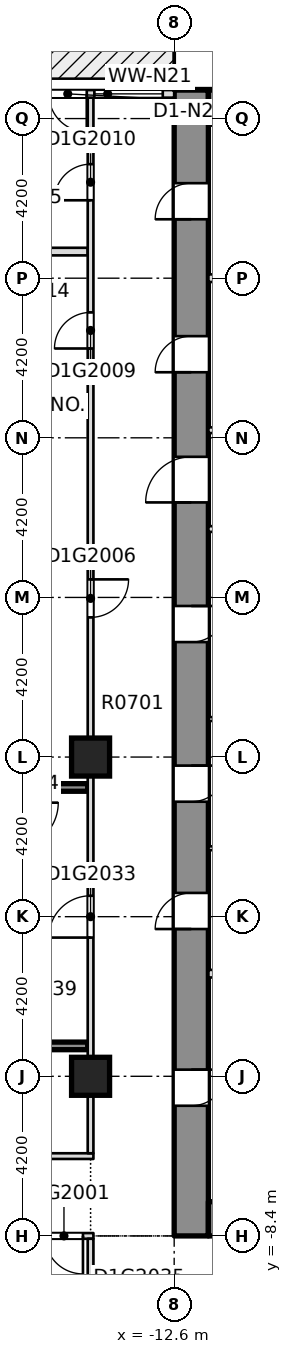
"""IFC4 building model, lengths in metres.
Left out: names, types, materials, properties, quantities, classifications, styles, units other than length and angle.
Written with IfcOpenShell. Run it as: python <this file> out.ifc"""

import sys

from ifc_helpers import new_model, si_unit, direction, frame, frame_2d, origin, origin_2d, place, context, subcontext, project, spatial, rectangle, extrude, element, fill, save


model = new_model("IFC4")
c1 = context("Model", 3, precision=1e-05, world=origin(), true_north=direction((0.0, 1.0)))
c2 = subcontext(c1, "Body", "Model", "MODEL_VIEW")
j1 = project(units=[si_unit("LENGTHUNIT", "METRE"), si_unit("PLANEANGLEUNIT", "RADIAN")], contexts=[c1])
p1 = place(None, origin())
s1 = spatial("IfcSite", under=j1, at=p1, CompositionType="ELEMENT")
p2 = place(p1, origin())
s2 = spatial("IfcBuilding", under=s1, at=p2, CompositionType="ELEMENT")
p3 = place(p2, frame((0.0, 0.0, 37.95)))
s3 = spatial("IfcBuildingStorey", under=s2, at=p3, CompositionType="ELEMENT", Elevation=37.95)
p4 = place(p3, frame((-12.15, -8.4, -0.32), z_axis=(0.0, 0.0, 1.0), x_axis=(0.0, 1.0, 0.0)))
e1 = element("IfcWall", 1, at=p4, inside=s3, PredefinedType="SHEAR", context=c2, shape_type="SweptSolid", body=[
    extrude(rectangle(XDim=30.15, YDim=0.9, at=frame_2d((15.075, 0.0))), origin(), (0.0, 0.0, 1.0), 3.45),
])
p5 = place(p4, frame((3.425, 0.0, 0.32)))
e2 = element("IfcOpeningElement", 2, at=p5, cuts=e1, PredefinedType="OPENING", context=c2, shape_type="SweptSolid", body=[
    extrude(rectangle(XDim=0.95, YDim=2.1, at=frame_2d((0.475, 1.05))), frame((0.0, 0.46, 0.0), z_axis=(0.0, -1.0, 0.0), x_axis=(1.0, 0.0, 0.0)), (0.0, 0.0, 1.0), 0.92),
])
p6 = place(p4, frame((8.075, 0.0, 0.32)))
e3 = element("IfcOpeningElement", 3, at=p6, cuts=e1, PredefinedType="OPENING", context=c2, shape_type="SweptSolid", body=[
    extrude(rectangle(XDim=0.95, YDim=2.1, at=frame_2d((0.475, 1.05))), frame((0.0, 0.46, 0.0), z_axis=(0.0, -1.0, 0.0), x_axis=(1.0, 0.0, 0.0)), (0.0, 0.0, 1.0), 0.92),
])
p7 = place(p4, frame((11.425, 0.0, 0.32)))
e4 = element("IfcOpeningElement", 4, at=p7, cuts=e1, PredefinedType="OPENING", context=c2, shape_type="SweptSolid", body=[
    extrude(rectangle(XDim=0.95, YDim=2.1, at=frame_2d((0.475, 1.05))), frame((0.0, 0.46, 0.0), z_axis=(0.0, -1.0, 0.0), x_axis=(1.0, 0.0, 0.0)), (0.0, 0.0, 1.0), 0.92),
])
p8 = place(p4, frame((15.625, 0.0, 0.32)))
e5 = element("IfcOpeningElement", 5, at=p8, cuts=e1, PredefinedType="OPENING", context=c2, shape_type="SweptSolid", body=[
    extrude(rectangle(XDim=0.95, YDim=2.1, at=frame_2d((0.475, 1.05))), frame((0.0, 0.46, 0.0), z_axis=(0.0, -1.0, 0.0), x_axis=(1.0, 0.0, 0.0)), (0.0, 0.0, 1.0), 0.92),
])
p9 = place(p4, frame((22.725, 0.0, 0.32)))
e6 = element("IfcOpeningElement", 6, at=p9, cuts=e1, PredefinedType="OPENING", context=c2, shape_type="SweptSolid", body=[
    extrude(rectangle(XDim=0.95, YDim=2.1, at=frame_2d((0.475, 1.05))), frame((0.0, 0.46, 0.0), z_axis=(0.0, -1.0, 0.0), x_axis=(1.0, 0.0, 0.0)), (0.0, 0.0, 1.0), 0.92),
])
p10 = place(p4, frame((26.75, 0.0, 0.32)))
e7 = element("IfcOpeningElement", 7, at=p10, cuts=e1, PredefinedType="OPENING", context=c2, shape_type="SweptSolid", body=[
    extrude(rectangle(XDim=0.95, YDim=2.1, at=frame_2d((0.475, 1.05))), frame((0.0, 0.46, 0.0), z_axis=(0.0, -1.0, 0.0), x_axis=(1.0, 0.0, 0.0)), (0.0, 0.0, 1.0), 0.92),
])
p11 = place(p4, frame((19.3, 0.0, 0.32)))
e8 = element("IfcOpeningElement", 8, at=p11, cuts=e1, PredefinedType="OPENING", context=c2, shape_type="SweptSolid", body=[
    extrude(rectangle(XDim=1.2, YDim=2.1, at=frame_2d((0.6, 1.05))), frame((0.0, 0.46, 0.0), z_axis=(0.0, -1.0, 0.0), x_axis=(1.0, 0.0, 0.0)), (0.0, 0.0, 1.0), 0.92),
])
p12 = place(p3, frame((-11.7, -7.95, -0.32), z_axis=(0.0, 0.0, 1.0), x_axis=(1.0, 0.0, 0.0)))
e9 = element("IfcWall", 9, at=p12, inside=s3, PredefinedType="SHEAR", context=c2, shape_type="SweptSolid", body=[
    extrude(rectangle(XDim=23.4, YDim=0.9, at=frame_2d((11.7, 0.0))), origin(), (0.0, 0.0, 1.0), 3.45),
])
p13 = place(p12, frame((6.95, 0.0, 0.32)))
e10 = element("IfcOpeningElement", 10, at=p13, cuts=e9, PredefinedType="OPENING", context=c2, shape_type="SweptSolid", body=[
    extrude(rectangle(XDim=1.8, YDim=2.1, at=frame_2d((0.9, 1.05))), frame((0.0, 0.46, 0.0), z_axis=(0.0, -1.0, 0.0), x_axis=(1.0, 0.0, 0.0)), (0.0, 0.0, 1.0), 0.92),
])
p14 = place(p12, frame((14.65, 0.0, 0.32)))
e11 = element("IfcOpeningElement", 11, at=p14, cuts=e9, PredefinedType="OPENING", context=c2, shape_type="SweptSolid", body=[
    extrude(rectangle(XDim=1.8, YDim=2.1, at=frame_2d((0.9, 1.05))), frame((0.0, 0.46, 0.0), z_axis=(0.0, -1.0, 0.0), x_axis=(1.0, 0.0, 0.0)), (0.0, 0.0, 1.0), 0.92),
])
p15 = place(p3, frame((-11.7, 21.3, -0.32), z_axis=(0.0, 0.0, 1.0), x_axis=(1.0, 0.0, 0.0)))
e12 = element("IfcWall", 12, at=p15, inside=s3, PredefinedType="SOLIDWALL", context=c2, shape_type="SweptSolid", body=[
    extrude(rectangle(XDim=23.4, YDim=0.9, at=frame_2d((11.7, 0.0))), origin(), (0.0, 0.0, 1.0), 3.45),
])
for number, where, z_axis, x_axis in (
    (13, (-14.8, -4.2, -0.32), (0.0, 0.0, 1.0), (1.0, 0.0, 0.0)),
    (14, (-14.8, 4.2, -0.32), (0.0, 0.0, 1.0), (1.0, 0.0, 0.0)),
):
    element("IfcColumn", number, at=place(p3, frame(where, z_axis=z_axis, x_axis=x_axis)), inside=s3, PredefinedType="COLUMN", context=c2, shape_type="SweptSolid", body=[
        extrude(rectangle(XDim=1.0, YDim=1.0, at=origin_2d()), origin(), (0.0, 0.0, 1.0), 3.45),
    ])
p16 = place(p3, frame((-25.75, -8.4, 0.0), z_axis=(0.0, 0.0, 1.0), x_axis=(1.0, 0.0, 0.0)))
e15 = element("IfcWall", 15, at=p16, inside=s3, PredefinedType="PARTITIONING", context=c2, shape_type="SweptSolid", body=[
    extrude(rectangle(XDim=11.025, YDim=0.15, at=frame_2d((5.512, 0.0))), origin(), (0.0, 0.0, 1.0), 3.13),
])
p17 = place(p16, frame((9.75, 0.0, 0.0)))
e16 = element("IfcOpeningElement", 16, at=p17, cuts=e15, PredefinedType="OPENING", context=c2, shape_type="SweptSolid", body=[
    extrude(rectangle(XDim=1.0, YDim=2.1, at=frame_2d((0.5, 1.05))), frame((0.0, 0.085, 0.0), z_axis=(0.0, -1.0, 0.0), x_axis=(1.0, 0.0, 0.0)), (0.0, 0.0, 1.0), 0.17),
])
p18 = place(p3, frame((-25.75, -6.3, 0.0), z_axis=(0.0, 0.0, 1.0), x_axis=(1.0, 0.0, 0.0)))
e17 = element("IfcWall", 17, at=p18, inside=s3, PredefinedType="PARTITIONING", context=c2, shape_type="SweptSolid", body=[
    extrude(rectangle(XDim=11.025, YDim=0.15, at=frame_2d((5.512, 0.0))), origin(), (0.0, 0.0, 1.0), 3.13),
])
p19 = place(p18, frame((4.875, 0.0, 0.0)))
e18 = element("IfcOpeningElement", 18, at=p19, cuts=e17, PredefinedType="OPENING", context=c2, shape_type="SweptSolid", body=[
    extrude(rectangle(XDim=1.0, YDim=2.1, at=frame_2d((0.5, 1.05))), frame((0.0, 0.085, 0.0), z_axis=(0.0, -1.0, 0.0), x_axis=(1.0, 0.0, 0.0)), (0.0, 0.0, 1.0), 0.17),
])
p20 = place(p3, frame((-23.0, -3.4, 0.0), z_axis=(0.0, 0.0, 1.0), x_axis=(1.0, 0.0, 0.0)))
e19 = element("IfcWall", 19, at=p20, inside=s3, PredefinedType="SOLIDWALL", context=c2, shape_type="SweptSolid", body=[
    extrude(rectangle(XDim=8.125, YDim=0.2, at=frame_2d((4.062, 0.0))), origin(), (0.0, 0.0, 1.0), 3.13),
])
p21 = place(p3, frame((-20.45, 3.4, 0.0), z_axis=(0.0, 0.0, 1.0), x_axis=(1.0, 0.0, 0.0)))
e20 = element("IfcWall", 20, at=p21, inside=s3, PredefinedType="SOLIDWALL", context=c2, shape_type="SweptSolid", body=[
    extrude(rectangle(XDim=5.575, YDim=0.2, at=frame_2d((2.788, 0.0))), origin(), (0.0, 0.0, 1.0), 3.13),
])
for number, where, z_axis, x_axis in (
    (21, (-17.35, 13.35, 0.0), (0.0, 0.0, 1.0), (1.0, 0.0, 0.0)),
    (22, (-17.35, 17.5, 0.0), (0.0, 0.0, 1.0), (1.0, 0.0, 0.0)),
):
    element("IfcWall", number, at=place(p3, frame(where, z_axis=z_axis, x_axis=x_axis)), inside=s3, PredefinedType="PARTITIONING", context=c2, shape_type="SweptSolid", body=[
        extrude(rectangle(XDim=2.475, YDim=0.2, at=frame_2d((1.238, 0.0))), origin(), (0.0, 0.0, 1.0), 3.13),
    ])
p22 = place(p3, frame((-14.8, -10.525, 0.0), z_axis=(0.0, 0.0, 1.0), x_axis=(0.0, 1.0, 0.0)))
e23 = element("IfcWall", 23, at=p22, inside=s3, PredefinedType="PARTITIONING", context=c2, shape_type="SweptSolid", body=[
    extrude(rectangle(XDim=2.05, YDim=0.15, at=frame_2d((1.025, 0.0))), origin(), (0.0, 0.0, 1.0), 3.13),
])
p23 = place(p3, frame((-14.8, -6.225, 0.0), z_axis=(0.0, 0.0, 1.0), x_axis=(0.0, 1.0, 0.0)))
e24 = element("IfcWall", 24, at=p23, inside=s3, PredefinedType="PARTITIONING", context=c2, shape_type="SweptSolid", body=[
    extrude(rectangle(XDim=27.775, YDim=0.15, at=frame_2d((13.888, 0.0))), origin(), (0.0, 0.0, 1.0), 3.13),
])
p24 = place(p23, frame((14.1, 0.0, 0.0)))
e25 = element("IfcOpeningElement", 25, at=p24, cuts=e24, PredefinedType="OPENING", context=c2, shape_type="SweptSolid", body=[
    extrude(rectangle(XDim=1.0, YDim=2.1, at=frame_2d((0.5, 1.05))), frame((0.0, 0.085, 0.0), z_axis=(0.0, -1.0, 0.0), x_axis=(1.0, 0.0, 0.0)), (0.0, 0.0, 1.0), 0.17),
])
p25 = place(p23, frame((21.175, 0.0, 0.0)))
e26 = element("IfcOpeningElement", 26, at=p25, cuts=e24, PredefinedType="OPENING", context=c2, shape_type="SweptSolid", body=[
    extrude(rectangle(XDim=0.95, YDim=2.1, at=frame_2d((0.475, 1.05))), frame((0.0, 0.085, 0.0), z_axis=(0.0, -1.0, 0.0), x_axis=(1.0, 0.0, 0.0)), (0.0, 0.0, 1.0), 0.17),
])
p26 = place(p23, frame((25.075, 0.0, 0.0)))
e27 = element("IfcOpeningElement", 27, at=p26, cuts=e24, PredefinedType="OPENING", context=c2, shape_type="SweptSolid", body=[
    extrude(rectangle(XDim=0.95, YDim=2.1, at=frame_2d((0.475, 1.05))), frame((0.0, 0.085, 0.0), z_axis=(0.0, -1.0, 0.0), x_axis=(1.0, 0.0, 0.0)), (0.0, 0.0, 1.0), 0.17),
])
p27 = place(p23, frame((5.675, 0.0, 0.0)))
e28 = element("IfcOpeningElement", 28, at=p27, cuts=e24, PredefinedType="OPENING", context=c2, shape_type="SweptSolid", body=[
    extrude(rectangle(XDim=1.1, YDim=2.1, at=frame_2d((0.55, 1.05))), frame((0.0, 0.085, 0.0), z_axis=(0.0, -1.0, 0.0), x_axis=(1.0, 0.0, 0.0)), (0.0, 0.0, 1.0), 0.17),
])
p28 = place(p3, frame((-12.6, 21.65, 0.0), z_axis=(0.0, 0.0, 1.0), x_axis=(-1.0, 0.0, 0.0)))
e29 = element("IfcWall", 29, at=p28, inside=s3, PredefinedType="STANDARD", context=c2, shape_type="SweptSolid", body=[
    extrude(rectangle(XDim=3.5, YDim=0.2, at=frame_2d((1.75, 0.0))), origin(), (0.0, 0.0, 1.0), 3.13),
])
p29 = place(p28, frame((0.3, 0.0, 0.2)))
e30 = element("IfcOpeningElement", 30, at=p29, cuts=e29, PredefinedType="OPENING", context=c2, shape_type="SweptSolid", body=[
    extrude(rectangle(XDim=1.8, YDim=2.65, at=frame_2d((0.9, 1.325))), frame((0.0, 0.11, 0.0), z_axis=(0.0, -1.0, 0.0), x_axis=(1.0, 0.0, 0.0)), (0.0, 0.0, 1.0), 0.22),
])
p30 = place(p28, frame((2.3, 0.0, 0.0)))
e31 = element("IfcOpeningElement", 31, at=p30, cuts=e29, PredefinedType="OPENING", context=c2, shape_type="SweptSolid", body=[
    extrude(rectangle(XDim=1.0, YDim=2.4, at=frame_2d((0.5, 1.2))), frame((0.0, 0.11, 0.0), z_axis=(0.0, -1.0, 0.0), x_axis=(1.0, 0.0, 0.0)), (0.0, 0.0, 1.0), 0.22),
])
p31 = place(p3, frame((-11.699, -1.5, 0.0), z_axis=(0.0, 0.0, 1.0), x_axis=(1.0, 0.0, 0.0)))
e32 = element("IfcWall", 32, at=p31, inside=s3, PredefinedType="PARTITIONING", context=c2, shape_type="SweptSolid", body=[
    extrude(rectangle(XDim=2.848, YDim=0.2, at=frame_2d((1.424, 0.0))), origin(), (0.0, 0.0, 1.0), 3.13),
])
for number, where, z_axis, x_axis in (
    (33, (-11.699, 1.8, 0.0), (0.0, 0.0, 1.0), (1.0, 0.0, 0.0)),
    (34, (-11.699, 5.2, 0.0), (0.0, 0.0, 1.0), (1.0, 0.0, 0.0)),
):
    element("IfcWall", number, at=place(p3, frame(where, z_axis=z_axis, x_axis=x_axis)), inside=s3, PredefinedType="PARTITIONING", context=c2, shape_type="SweptSolid", body=[
        extrude(rectangle(XDim=2.848, YDim=0.1, at=frame_2d((1.424, 0.0))), origin(), (0.0, 0.0, 1.0), 3.13),
    ])
for number, where, z_axis, x_axis in (
    (35, (-11.699, 10.2, 0.0), (0.0, 0.0, 1.0), (1.0, 0.0, 0.0)),
    (36, (-11.699, 12.8, 0.0), (0.0, 0.0, 1.0), (1.0, 0.0, 0.0)),
):
    element("IfcWall", number, at=place(p3, frame(where, z_axis=z_axis, x_axis=x_axis)), inside=s3, PredefinedType="PARTITIONING", context=c2, shape_type="SweptSolid", body=[
        extrude(rectangle(XDim=2.848, YDim=0.15, at=frame_2d((1.424, 0.0))), origin(), (0.0, 0.0, 1.0), 3.13),
    ])
p32 = place(p3, frame((-11.699, 16.8, 0.0), z_axis=(0.0, 0.0, 1.0), x_axis=(1.0, 0.0, 0.0)))
e37 = element("IfcWall", 37, at=p32, inside=s3, PredefinedType="PARTITIONING", context=c2, shape_type="SweptSolid", body=[
    extrude(rectangle(XDim=2.848, YDim=0.2, at=frame_2d((1.424, 0.0))), origin(), (0.0, 0.0, 1.0), 3.13),
])
p33 = place(p17, origin())
e38 = element("IfcDoor", 38, at=p33, inside=s3, OperationType="SINGLE_SWING_RIGHT", PredefinedType="DOOR", context=c2, shape_type="SweptSolid", body=[
    extrude(rectangle(XDim=1.0, YDim=2.1, at=frame_2d((0.5, 1.05))), frame((0.0, 0.025, 0.0), z_axis=(0.0, -1.0, 0.0), x_axis=(1.0, 0.0, 0.0)), (0.0, 0.0, 1.0), 0.05),
])
fill(e16, e38)
p34 = place(p24, origin())
e39 = element("IfcDoor", 39, at=p34, inside=s3, OperationType="SINGLE_SWING_LEFT", PredefinedType="DOOR", context=c2, shape_type="SweptSolid", body=[
    extrude(rectangle(XDim=1.0, YDim=2.1, at=frame_2d((0.5, 1.05))), frame((0.0, 0.025, 0.0), z_axis=(0.0, -1.0, 0.0), x_axis=(1.0, 0.0, 0.0)), (0.0, 0.0, 1.0), 0.05),
])
fill(e25, e39)
p35 = place(p25, origin())
e40 = element("IfcDoor", 40, at=p35, inside=s3, OperationType="SINGLE_SWING_RIGHT", PredefinedType="DOOR", context=c2, shape_type="SweptSolid", body=[
    extrude(rectangle(XDim=0.95, YDim=2.1, at=frame_2d((0.475, 1.05))), frame((0.0, 0.025, 0.0), z_axis=(0.0, -1.0, 0.0), x_axis=(1.0, 0.0, 0.0)), (0.0, 0.0, 1.0), 0.05),
])
fill(e26, e40)
p36 = place(p26, origin())
e41 = element("IfcDoor", 41, at=p36, inside=s3, OperationType="SINGLE_SWING_LEFT", PredefinedType="DOOR", context=c2, shape_type="SweptSolid", body=[
    extrude(rectangle(XDim=0.95, YDim=2.1, at=frame_2d((0.475, 1.05))), frame((0.0, 0.025, 0.0), z_axis=(0.0, -1.0, 0.0), x_axis=(1.0, 0.0, 0.0)), (0.0, 0.0, 1.0), 0.05),
])
fill(e27, e41)
p37 = place(p27, origin())
e42 = element("IfcDoor", 42, at=p37, inside=s3, OperationType="SINGLE_SWING_RIGHT", PredefinedType="DOOR", context=c2, shape_type="SweptSolid", body=[
    extrude(rectangle(XDim=1.1, YDim=2.1, at=frame_2d((0.55, 1.05))), frame((0.0, 0.025, 0.0), z_axis=(0.0, -1.0, 0.0), x_axis=(1.0, 0.0, 0.0)), (0.0, 0.0, 1.0), 0.05),
])
fill(e28, e42)
p38 = place(p29, origin())
e43 = element("IfcWindow", 43, at=p38, inside=s3, PartitioningType="SINGLE_PANEL", PredefinedType="WINDOW", context=c2, shape_type="SweptSolid", body=[
    extrude(rectangle(XDim=1.8, YDim=2.65, at=frame_2d((0.9, 1.325))), frame((0.0, 0.03, 0.0), z_axis=(0.0, -1.0, 0.0), x_axis=(1.0, 0.0, 0.0)), (0.0, 0.0, 1.0), 0.06),
])
fill(e30, e43)
p39 = place(p30, origin())
e44 = element("IfcDoor", 44, at=p39, inside=s3, OperationType="SINGLE_SWING_LEFT", PredefinedType="DOOR", context=c2, shape_type="SweptSolid", body=[
    extrude(rectangle(XDim=1.0, YDim=2.4, at=frame_2d((0.5, 1.2))), frame((0.0, 0.025, 0.0), z_axis=(0.0, -1.0, 0.0), x_axis=(1.0, 0.0, 0.0)), (0.0, 0.0, 1.0), 0.05),
])
fill(e31, e44)
p40 = place(p5, origin())
e45 = element("IfcDoor", 45, at=p40, inside=s3, OperationType="SINGLE_SWING_LEFT", PredefinedType="DOOR", context=c2, shape_type="SweptSolid", body=[
    extrude(rectangle(XDim=0.95, YDim=2.1, at=frame_2d((0.475, 1.05))), frame((0.0, 0.025, 0.0), z_axis=(0.0, -1.0, 0.0), x_axis=(1.0, 0.0, 0.0)), (0.0, 0.0, 1.0), 0.05),
])
fill(e2, e45)
p41 = place(p6, origin())
e46 = element("IfcDoor", 46, at=p41, inside=s3, OperationType="SINGLE_SWING_LEFT", PredefinedType="DOOR", context=c2, shape_type="SweptSolid", body=[
    extrude(rectangle(XDim=0.95, YDim=2.1, at=frame_2d((0.475, 1.05))), frame((0.0, 0.025, 0.0), z_axis=(0.0, -1.0, 0.0), x_axis=(1.0, 0.0, 0.0)), (0.0, 0.0, 1.0), 0.05),
])
fill(e3, e46)
p42 = place(p7, origin())
e47 = element("IfcDoor", 47, at=p42, inside=s3, OperationType="SINGLE_SWING_LEFT", PredefinedType="DOOR", context=c2, shape_type="SweptSolid", body=[
    extrude(rectangle(XDim=0.95, YDim=2.1, at=frame_2d((0.475, 1.05))), frame((0.0, 0.025, 0.0), z_axis=(0.0, -1.0, 0.0), x_axis=(1.0, 0.0, 0.0)), (0.0, 0.0, 1.0), 0.05),
])
fill(e4, e47)
p43 = place(p8, origin())
e48 = element("IfcDoor", 48, at=p43, inside=s3, OperationType="SINGLE_SWING_LEFT", PredefinedType="DOOR", context=c2, shape_type="SweptSolid", body=[
    extrude(rectangle(XDim=0.95, YDim=2.1, at=frame_2d((0.475, 1.05))), frame((0.0, 0.025, 0.0), z_axis=(0.0, -1.0, 0.0), x_axis=(1.0, 0.0, 0.0)), (0.0, 0.0, 1.0), 0.05),
])
fill(e5, e48)
p44 = place(p9, origin())
e49 = element("IfcDoor", 49, at=p44, inside=s3, OperationType="SINGLE_SWING_LEFT", PredefinedType="DOOR", context=c2, shape_type="SweptSolid", body=[
    extrude(rectangle(XDim=0.95, YDim=2.1, at=frame_2d((0.475, 1.05))), frame((0.0, 0.025, 0.0), z_axis=(0.0, -1.0, 0.0), x_axis=(1.0, 0.0, 0.0)), (0.0, 0.0, 1.0), 0.05),
])
fill(e6, e49)
p45 = place(p10, origin())
e50 = element("IfcDoor", 50, at=p45, inside=s3, OperationType="SINGLE_SWING_LEFT", PredefinedType="DOOR", context=c2, shape_type="SweptSolid", body=[
    extrude(rectangle(XDim=0.95, YDim=2.1, at=frame_2d((0.475, 1.05))), frame((0.0, 0.025, 0.0), z_axis=(0.0, -1.0, 0.0), x_axis=(1.0, 0.0, 0.0)), (0.0, 0.0, 1.0), 0.05),
])
fill(e7, e50)
p46 = place(p11, origin())
e51 = element("IfcDoor", 51, at=p46, inside=s3, OperationType="SINGLE_SWING_LEFT", PredefinedType="DOOR", context=c2, shape_type="SweptSolid", body=[
    extrude(rectangle(XDim=1.2, YDim=2.1, at=frame_2d((0.6, 1.05))), frame((0.0, 0.025, 0.0), z_axis=(0.0, -1.0, 0.0), x_axis=(1.0, 0.0, 0.0)), (0.0, 0.0, 1.0), 0.05),
])
fill(e8, e51)
save(model, sys.argv[1])
